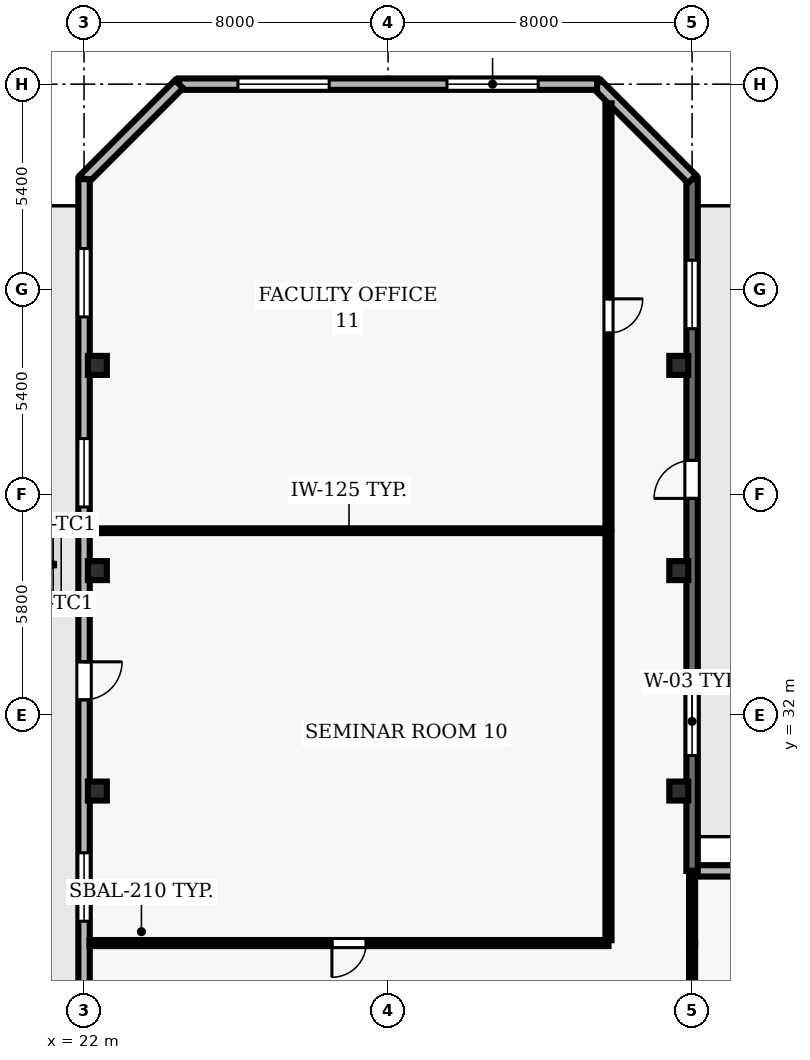
"""IFC4 building model, lengths in metres.
Left out: names, types, materials, properties, quantities, classifications, styles, units other than length and angle.
Written with IfcOpenShell. Run it as: python <this file> out.ifc"""

import sys

from ifc_helpers import new_model, si_unit, direction, frame, frame_2d, origin, origin_2d, place, context, subcontext, project, spatial, rectangle, hollow_rectangle, extrude, element, fill, save


model = new_model("IFC4")
c1 = context("Model", 3, precision=1e-05, world=origin(), true_north=direction((0.0, 1.0)))
c2 = subcontext(c1, "Body", "Model", "MODEL_VIEW")
j1 = project(units=[si_unit("LENGTHUNIT", "METRE"), si_unit("PLANEANGLEUNIT", "RADIAN")], contexts=[c1])
p1 = place(None, origin())
s1 = spatial("IfcSite", under=j1, at=p1, CompositionType="ELEMENT")
p2 = place(p1, origin())
s2 = spatial("IfcBuilding", under=s1, at=p2, CompositionType="ELEMENT")
p3 = place(p2, frame((0.0, 0.0, 126.8)))
s3 = spatial("IfcBuildingStorey", under=s2, at=p3, CompositionType="ELEMENT", Elevation=126.8)
for number, where, z_axis, x_axis in (
    (1, (22.35, 30.0, 0.0), (0.0, 0.0, 1.0), (1.0, 0.0, 0.0)),
    (2, (37.65, 30.0, 0.0), (0.0, 0.0, 1.0), (1.0, 0.0, 0.0)),
    (3, (22.35, 35.8, 0.0), (0.0, 0.0, 1.0), (1.0, 0.0, 0.0)),
    (4, (37.65, 35.8, 0.0), (0.0, 0.0, 1.0), (1.0, 0.0, 0.0)),
    (5, (22.35, 41.2, 0.0), (0.0, 0.0, 1.0), (1.0, 0.0, 0.0)),
    (6, (37.65, 41.2, 0.0), (0.0, 0.0, 1.0), (1.0, 0.0, 0.0)),
):
    element("IfcColumn", number, at=place(p3, frame(where, z_axis=z_axis, x_axis=x_axis)), inside=s3, PredefinedType="COLUMN", context=c2, shape_type="SweptSolid", body=[
        extrude(hollow_rectangle(XDim=0.5, YDim=0.5, WallThickness=0.025, at=origin_2d()), origin(), (0.0, 0.0, 1.0), 3.9),
    ])
p4 = place(p3, frame((46.151, 27.9, 0.0), z_axis=(0.0, 0.0, 1.0), x_axis=(-1.0, 0.0, 0.0)))
e7 = element("IfcWall", 7, at=p4, inside=s3, PredefinedType="SOLIDWALL", context=c2, shape_type="SweptSolid", body=[
    extrude(rectangle(XDim=8.151, YDim=0.3, at=frame_2d((4.075, 0.0))), origin(), (0.0, 0.0, 1.0), 3.69),
])
p5 = place(p4, frame((3.326, 0.0, 0.9)))
e8 = element("IfcOpeningElement", 8, at=p5, cuts=e7, PredefinedType="OPENING", context=c2, shape_type="SweptSolid", body=[
    extrude(rectangle(XDim=1.5, YDim=1.6, at=frame_2d((0.75, 0.8))), frame((0.0, 0.16, 0.0), z_axis=(0.0, -1.0, 0.0), x_axis=(1.0, 0.0, 0.0)), (0.0, 0.0, 1.0), 0.32),
])
p6 = place(p3, frame((38.0, 27.9, 0.0), z_axis=(0.0, 0.0, 1.0), x_axis=(0.0, 1.0, 0.0)))
e9 = element("IfcWall", 9, at=p6, inside=s3, PredefinedType="SOLIDWALL", context=c2, shape_type="SweptSolid", body=[
    extrude(rectangle(XDim=18.2, YDim=0.3, at=frame_2d((9.1, 0.0))), origin(), (0.0, 0.0, 1.0), 3.69),
])
p7 = place(p6, frame((9.8, 0.0, 0.0)))
e10 = element("IfcOpeningElement", 10, at=p7, cuts=e9, PredefinedType="OPENING", context=c2, shape_type="SweptSolid", body=[
    extrude(rectangle(XDim=1.0, YDim=2.2, at=frame_2d((0.5, 1.1))), frame((0.0, 0.16, 0.0), z_axis=(0.0, -1.0, 0.0), x_axis=(1.0, 0.0, 0.0)), (0.0, 0.0, 1.0), 0.32),
])
p8 = place(p6, frame((3.033, 0.0, 0.9)))
e11 = element("IfcOpeningElement", 11, at=p8, cuts=e9, PredefinedType="OPENING", context=c2, shape_type="SweptSolid", body=[
    extrude(rectangle(XDim=1.8, YDim=1.6, at=frame_2d((0.9, 0.8))), frame((0.0, 0.16, 0.0), z_axis=(0.0, -1.0, 0.0), x_axis=(1.0, 0.0, 0.0)), (0.0, 0.0, 1.0), 0.32),
])
p9 = place(p6, frame((14.267, 0.0, 0.9)))
e12 = element("IfcOpeningElement", 12, at=p9, cuts=e9, PredefinedType="OPENING", context=c2, shape_type="SweptSolid", body=[
    extrude(rectangle(XDim=1.8, YDim=1.6, at=frame_2d((0.9, 0.8))), frame((0.0, 0.16, 0.0), z_axis=(0.0, -1.0, 0.0), x_axis=(1.0, 0.0, 0.0)), (0.0, 0.0, 1.0), 0.32),
])
p10 = place(p3, frame((38.0, 46.1, 0.0), z_axis=(0.0, 0.0, 1.0), x_axis=(-0.707106781187, 0.707106781187, 0.0)))
e13 = element("IfcWall", 13, at=p10, inside=s3, PredefinedType="SOLIDWALL", context=c2, shape_type="SweptSolid", body=[
    extrude(rectangle(XDim=3.536, YDim=0.3, at=frame_2d((1.768, 0.0))), origin(), (0.0, 0.0, 1.0), 3.69),
])
p11 = place(p3, frame((35.5, 48.6, 0.0), z_axis=(0.0, 0.0, 1.0), x_axis=(-1.0, 0.0, 0.0)))
e14 = element("IfcWall", 14, at=p11, inside=s3, PredefinedType="SOLIDWALL", context=c2, shape_type="SweptSolid", body=[
    extrude(rectangle(XDim=11.0, YDim=0.3, at=frame_2d((5.5, 0.0))), origin(), (0.0, 0.0, 1.0), 3.69),
])
p12 = place(p11, frame((1.55, 0.0, 0.9)))
e15 = element("IfcOpeningElement", 15, at=p12, cuts=e14, PredefinedType="OPENING", context=c2, shape_type="SweptSolid", body=[
    extrude(rectangle(XDim=2.4, YDim=1.6, at=frame_2d((1.2, 0.8))), frame((0.0, 0.16, 0.0), z_axis=(0.0, -1.0, 0.0), x_axis=(1.0, 0.0, 0.0)), (0.0, 0.0, 1.0), 0.32),
])
p13 = place(p11, frame((7.05, 0.0, 0.9)))
e16 = element("IfcOpeningElement", 16, at=p13, cuts=e14, PredefinedType="OPENING", context=c2, shape_type="SweptSolid", body=[
    extrude(rectangle(XDim=2.4, YDim=1.6, at=frame_2d((1.2, 0.8))), frame((0.0, 0.16, 0.0), z_axis=(0.0, -1.0, 0.0), x_axis=(1.0, 0.0, 0.0)), (0.0, 0.0, 1.0), 0.32),
])
p14 = place(p3, frame((24.5, 48.6, 0.0), z_axis=(0.0, 0.0, 1.0), x_axis=(-0.707106781187, -0.707106781187, 0.0)))
e17 = element("IfcWall", 17, at=p14, inside=s3, PredefinedType="SOLIDWALL", context=c2, shape_type="SweptSolid", body=[
    extrude(rectangle(XDim=3.536, YDim=0.3, at=frame_2d((1.768, 0.0))), origin(), (0.0, 0.0, 1.0), 3.69),
])
p15 = place(p3, frame((22.0, 46.1, 0.0), z_axis=(0.0, 0.0, 1.0), x_axis=(0.0, -1.0, 0.0)))
e18 = element("IfcWall", 18, at=p15, inside=s3, PredefinedType="SOLIDWALL", context=c2, shape_type="SweptSolid", body=[
    extrude(rectangle(XDim=43.6, YDim=0.3, at=frame_2d((21.8, 0.0))), origin(), (0.0, 0.0, 1.0), 3.69),
])
p16 = place(p15, frame((12.7, 0.0, 0.0)))
e19 = element("IfcOpeningElement", 19, at=p16, cuts=e18, PredefinedType="OPENING", context=c2, shape_type="SweptSolid", body=[
    extrude(rectangle(XDim=1.0, YDim=2.2, at=frame_2d((0.5, 1.1))), frame((0.0, 0.16, 0.0), z_axis=(0.0, -1.0, 0.0), x_axis=(1.0, 0.0, 0.0)), (0.0, 0.0, 1.0), 0.32),
])
p17 = place(p15, frame((1.825, 0.0, 0.9)))
e20 = element("IfcOpeningElement", 20, at=p17, cuts=e18, PredefinedType="OPENING", context=c2, shape_type="SweptSolid", body=[
    extrude(rectangle(XDim=1.8, YDim=1.8, at=frame_2d((0.9, 0.9))), frame((0.0, 0.16, 0.0), z_axis=(0.0, -1.0, 0.0), x_axis=(1.0, 0.0, 0.0)), (0.0, 0.0, 1.0), 0.32),
])
p18 = place(p15, frame((6.825, 0.0, 0.9)))
e21 = element("IfcOpeningElement", 21, at=p18, cuts=e18, PredefinedType="OPENING", context=c2, shape_type="SweptSolid", body=[
    extrude(rectangle(XDim=1.8, YDim=1.8, at=frame_2d((0.9, 0.9))), frame((0.0, 0.16, 0.0), z_axis=(0.0, -1.0, 0.0), x_axis=(1.0, 0.0, 0.0)), (0.0, 0.0, 1.0), 0.32),
])
p19 = place(p15, frame((17.725, 0.0, 0.9)))
e22 = element("IfcOpeningElement", 22, at=p19, cuts=e18, PredefinedType="OPENING", context=c2, shape_type="SweptSolid", body=[
    extrude(rectangle(XDim=1.8, YDim=1.8, at=frame_2d((0.9, 0.9))), frame((0.0, 0.16, 0.0), z_axis=(0.0, -1.0, 0.0), x_axis=(1.0, 0.0, 0.0)), (0.0, 0.0, 1.0), 0.32),
])
p20 = place(p15, frame((23.625, 0.0, 0.9)))
e23 = element("IfcOpeningElement", 23, at=p20, cuts=e18, PredefinedType="OPENING", context=c2, shape_type="SweptSolid", body=[
    extrude(rectangle(XDim=1.8, YDim=1.8, at=frame_2d((0.9, 0.9))), frame((0.0, 0.16, 0.0), z_axis=(0.0, -1.0, 0.0), x_axis=(1.0, 0.0, 0.0)), (0.0, 0.0, 1.0), 0.32),
])
p21 = place(p15, frame((28.625, 0.0, 0.9)))
e24 = element("IfcOpeningElement", 24, at=p21, cuts=e18, PredefinedType="OPENING", context=c2, shape_type="SweptSolid", body=[
    extrude(rectangle(XDim=1.8, YDim=1.8, at=frame_2d((0.9, 0.9))), frame((0.0, 0.16, 0.0), z_axis=(0.0, -1.0, 0.0), x_axis=(1.0, 0.0, 0.0)), (0.0, 0.0, 1.0), 0.32),
])
p22 = place(p15, frame((34.525, 0.0, 0.9)))
e25 = element("IfcOpeningElement", 25, at=p22, cuts=e18, PredefinedType="OPENING", context=c2, shape_type="SweptSolid", body=[
    extrude(rectangle(XDim=1.8, YDim=1.8, at=frame_2d((0.9, 0.9))), frame((0.0, 0.16, 0.0), z_axis=(0.0, -1.0, 0.0), x_axis=(1.0, 0.0, 0.0)), (0.0, 0.0, 1.0), 0.32),
])
p23 = place(p3, frame((35.8, 26.0, 0.0), z_axis=(0.0, 0.0, 1.0), x_axis=(-1.0, 0.0, 0.0)))
e26 = element("IfcWall", 26, at=p23, inside=s3, PredefinedType="PARTITIONING", context=c2, shape_type="SweptSolid", body=[
    extrude(rectangle(XDim=13.655, YDim=0.16, at=frame_2d((6.828, 0.0))), origin(), (0.0, 0.0, 1.0), 3.69),
])
p24 = place(p23, frame((6.377, 0.0, 0.0)))
e27 = element("IfcOpeningElement", 27, at=p24, cuts=e26, PredefinedType="OPENING", context=c2, shape_type="SweptSolid", body=[
    extrude(rectangle(XDim=0.9, YDim=2.1, at=frame_2d((0.45, 1.05))), frame((0.0, 0.09, 0.0), z_axis=(0.0, -1.0, 0.0), x_axis=(1.0, 0.0, 0.0)), (0.0, 0.0, 1.0), 0.18),
])
p25 = place(p3, frame((35.8, 36.85, 0.0), z_axis=(0.0, 0.0, 1.0), x_axis=(-1.0, 0.0, 0.0)))
e28 = element("IfcWall", 28, at=p25, inside=s3, PredefinedType="PARTITIONING", context=c2, shape_type="SweptSolid", body=[
    extrude(rectangle(XDim=13.655, YDim=0.125, at=frame_2d((6.828, 0.0))), origin(), (0.0, 0.0, 1.0), 3.69),
])
p26 = place(p3, frame((35.8, 36.793, 0.0), z_axis=(0.0, 0.0, 1.0), x_axis=(0.0, -1.0, 0.0)))
e29 = element("IfcWall", 29, at=p26, inside=s3, PredefinedType="PARTITIONING", context=c2, shape_type="SweptSolid", body=[
    extrude(rectangle(XDim=10.718, YDim=0.16, at=frame_2d((5.359, 0.0))), origin(), (0.0, 0.0, 1.0), 3.69),
])
p27 = place(p3, frame((35.8, 48.095, 0.0), z_axis=(0.0, 0.0, 1.0), x_axis=(0.0, -1.0, 0.0)))
e30 = element("IfcWall", 30, at=p27, inside=s3, PredefinedType="PARTITIONING", context=c2, shape_type="SweptSolid", body=[
    extrude(rectangle(XDim=11.188, YDim=0.16, at=frame_2d((5.594, 0.0))), origin(), (0.0, 0.0, 1.0), 3.69),
])
p28 = place(p27, frame((5.144, 0.0, 0.0)))
e31 = element("IfcOpeningElement", 31, at=p28, cuts=e30, PredefinedType="OPENING", context=c2, shape_type="SweptSolid", body=[
    extrude(rectangle(XDim=0.9, YDim=2.1, at=frame_2d((0.45, 1.05))), frame((0.0, 0.09, 0.0), z_axis=(0.0, -1.0, 0.0), x_axis=(1.0, 0.0, 0.0)), (0.0, 0.0, 1.0), 0.18),
])
p29 = place(p3, frame((38.0, 23.85, 0.0), z_axis=(0.0, 0.0, 1.0), x_axis=(0.0, 1.0, 0.0)))
e32 = element("IfcWall", 32, at=p29, inside=s3, PredefinedType="PARTITIONING", context=c2, shape_type="SweptSolid", body=[
    extrude(rectangle(XDim=2.15, YDim=0.16, at=frame_2d((1.075, 0.0))), origin(), (0.0, 0.0, 1.0), 3.074),
])
p30 = place(p3, frame((38.0, 26.0, 0.0), z_axis=(0.0, 0.0, 1.0), x_axis=(0.0, 1.0, 0.0)))
e33 = element("IfcWall", 33, at=p30, inside=s3, PredefinedType="PARTITIONING", context=c2, shape_type="SweptSolid", body=[
    extrude(rectangle(XDim=1.755, YDim=0.16, at=frame_2d((0.877, 0.0))), origin(), (0.0, 0.0, 1.0), 3.074),
])
p31 = place(p7, origin())
e34 = element("IfcDoor", 34, at=p31, inside=s3, OperationType="SINGLE_SWING_LEFT", PredefinedType="DOOR", context=c2, shape_type="SweptSolid", body=[
    extrude(rectangle(XDim=1.0, YDim=2.2, at=frame_2d((0.5, 1.1))), frame((0.0, 0.025, 0.0), z_axis=(0.0, -1.0, 0.0), x_axis=(1.0, 0.0, 0.0)), (0.0, 0.0, 1.0), 0.05),
])
fill(e10, e34)
p32 = place(p8, origin())
e35 = element("IfcWindow", 35, at=p32, inside=s3, PartitioningType="SINGLE_PANEL", PredefinedType="WINDOW", context=c2, shape_type="SweptSolid", body=[
    extrude(rectangle(XDim=1.8, YDim=1.6, at=frame_2d((0.9, 0.8))), frame((0.0, 0.03, 0.0), z_axis=(0.0, -1.0, 0.0), x_axis=(1.0, 0.0, 0.0)), (0.0, 0.0, 1.0), 0.06),
])
fill(e11, e35)
p33 = place(p9, origin())
e36 = element("IfcWindow", 36, at=p33, inside=s3, PartitioningType="SINGLE_PANEL", PredefinedType="WINDOW", context=c2, shape_type="SweptSolid", body=[
    extrude(rectangle(XDim=1.8, YDim=1.6, at=frame_2d((0.9, 0.8))), frame((0.0, 0.03, 0.0), z_axis=(0.0, -1.0, 0.0), x_axis=(1.0, 0.0, 0.0)), (0.0, 0.0, 1.0), 0.06),
])
fill(e12, e36)
p34 = place(p12, origin())
e37 = element("IfcWindow", 37, at=p34, inside=s3, PartitioningType="SINGLE_PANEL", PredefinedType="WINDOW", context=c2, shape_type="SweptSolid", body=[
    extrude(rectangle(XDim=2.4, YDim=1.6, at=frame_2d((1.2, 0.8))), frame((0.0, 0.03, 0.0), z_axis=(0.0, -1.0, 0.0), x_axis=(1.0, 0.0, 0.0)), (0.0, 0.0, 1.0), 0.06),
])
fill(e15, e37)
p35 = place(p13, origin())
e38 = element("IfcWindow", 38, at=p35, inside=s3, PartitioningType="SINGLE_PANEL", PredefinedType="WINDOW", context=c2, shape_type="SweptSolid", body=[
    extrude(rectangle(XDim=2.4, YDim=1.6, at=frame_2d((1.2, 0.8))), frame((0.0, 0.03, 0.0), z_axis=(0.0, -1.0, 0.0), x_axis=(1.0, 0.0, 0.0)), (0.0, 0.0, 1.0), 0.06),
])
fill(e16, e38)
p36 = place(p16, origin())
e39 = element("IfcDoor", 39, at=p36, inside=s3, OperationType="SINGLE_SWING_LEFT", PredefinedType="DOOR", context=c2, shape_type="SweptSolid", body=[
    extrude(rectangle(XDim=1.0, YDim=2.2, at=frame_2d((0.5, 1.1))), frame((0.0, 0.025, 0.0), z_axis=(0.0, -1.0, 0.0), x_axis=(1.0, 0.0, 0.0)), (0.0, 0.0, 1.0), 0.05),
])
fill(e19, e39)
p37 = place(p17, origin())
e40 = element("IfcWindow", 40, at=p37, inside=s3, PartitioningType="SINGLE_PANEL", PredefinedType="WINDOW", context=c2, shape_type="SweptSolid", body=[
    extrude(rectangle(XDim=1.8, YDim=1.8, at=frame_2d((0.9, 0.9))), frame((0.0, 0.03, 0.0), z_axis=(0.0, -1.0, 0.0), x_axis=(1.0, 0.0, 0.0)), (0.0, 0.0, 1.0), 0.06),
])
fill(e20, e40)
p38 = place(p18, origin())
e41 = element("IfcWindow", 41, at=p38, inside=s3, PartitioningType="SINGLE_PANEL", PredefinedType="WINDOW", context=c2, shape_type="SweptSolid", body=[
    extrude(rectangle(XDim=1.8, YDim=1.8, at=frame_2d((0.9, 0.9))), frame((0.0, 0.03, 0.0), z_axis=(0.0, -1.0, 0.0), x_axis=(1.0, 0.0, 0.0)), (0.0, 0.0, 1.0), 0.06),
])
fill(e21, e41)
p39 = place(p19, origin())
e42 = element("IfcWindow", 42, at=p39, inside=s3, PartitioningType="SINGLE_PANEL", PredefinedType="WINDOW", context=c2, shape_type="SweptSolid", body=[
    extrude(rectangle(XDim=1.8, YDim=1.8, at=frame_2d((0.9, 0.9))), frame((0.0, 0.03, 0.0), z_axis=(0.0, -1.0, 0.0), x_axis=(1.0, 0.0, 0.0)), (0.0, 0.0, 1.0), 0.06),
])
fill(e22, e42)
p40 = place(p24, origin())
e43 = element("IfcDoor", 43, at=p40, inside=s3, OperationType="SINGLE_SWING_RIGHT", PredefinedType="DOOR", context=c2, shape_type="SweptSolid", body=[
    extrude(rectangle(XDim=0.9, YDim=2.1, at=frame_2d((0.45, 1.05))), frame((0.0, 0.025, 0.0), z_axis=(0.0, -1.0, 0.0), x_axis=(1.0, 0.0, 0.0)), (0.0, 0.0, 1.0), 0.05),
])
fill(e27, e43)
p41 = place(p28, origin())
e44 = element("IfcDoor", 44, at=p41, inside=s3, OperationType="SINGLE_SWING_LEFT", PredefinedType="DOOR", context=c2, shape_type="SweptSolid", body=[
    extrude(rectangle(XDim=0.9, YDim=2.1, at=frame_2d((0.45, 1.05))), frame((0.0, 0.025, 0.0), z_axis=(0.0, -1.0, 0.0), x_axis=(1.0, 0.0, 0.0)), (0.0, 0.0, 1.0), 0.05),
])
fill(e31, e44)
save(model, sys.argv[1])
